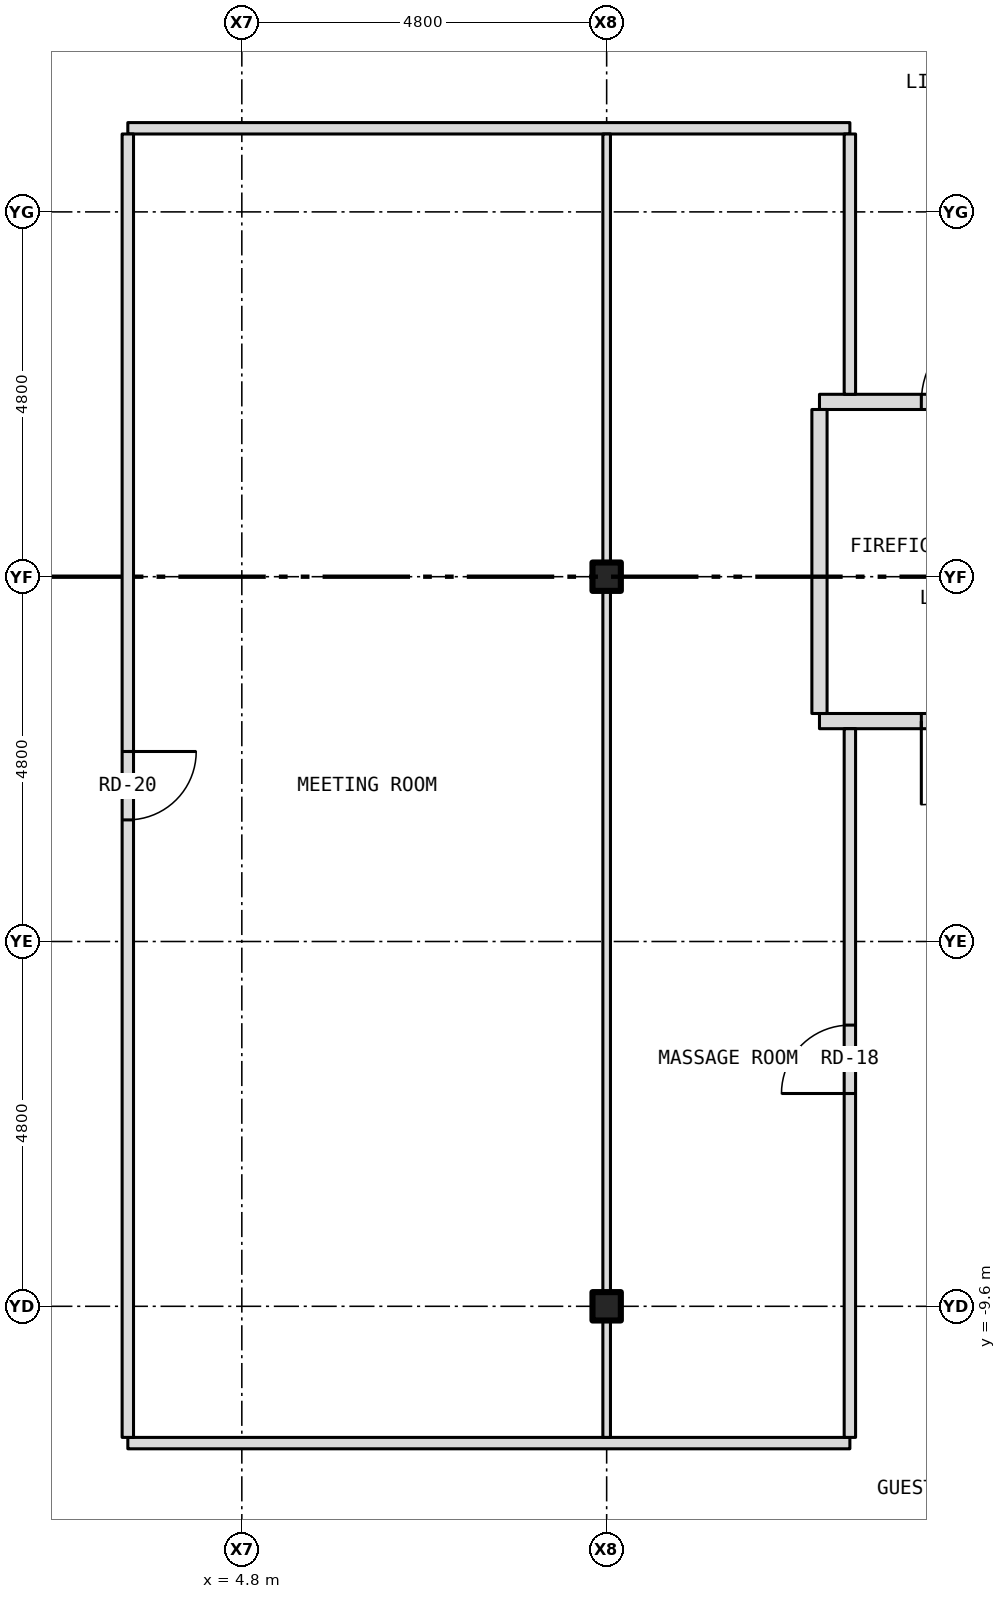
"""IFC4 building model, lengths in metres.
Left out: names, types, materials, properties, quantities, classifications, styles, units other than length and angle.
Written with IfcOpenShell. Run it as: python <this file> out.ifc"""

import sys

from ifc_helpers import new_model, si_unit, direction, frame, frame_2d, origin, origin_2d, place, context, subcontext, project, spatial, rectangle, i_section, extrude, element, fill, save


model = new_model("IFC4")
c1 = context("Model", 3, precision=1e-05, world=origin(), true_north=direction((0.0, 1.0)))
c2 = subcontext(c1, "Body", "Model", "MODEL_VIEW")
j1 = project(units=[si_unit("LENGTHUNIT", "METRE"), si_unit("PLANEANGLEUNIT", "RADIAN")], contexts=[c1])
p1 = place(None, origin())
s1 = spatial("IfcSite", under=j1, at=p1, CompositionType="ELEMENT")
p2 = place(p1, origin())
s2 = spatial("IfcBuilding", under=s1, at=p2, CompositionType="ELEMENT")
p3 = place(p2, frame((0.0, 0.0, 169.0)))
s3 = spatial("IfcBuildingStorey", under=s2, at=p3, CompositionType="ELEMENT", Elevation=169.0)
for number, where, z_axis, x_axis in (
    (1, (9.6, -9.6, -0.15), (0.0, 0.0, 1.0), (1.0, 0.0, 0.0)),
    (2, (9.6, 0.0, -0.15), (0.0, 0.0, 1.0), (1.0, 0.0, 0.0)),
):
    element("IfcColumn", number, at=place(p3, frame(where, z_axis=z_axis, x_axis=x_axis)), inside=s3, PredefinedType="COLUMN", context=c2, shape_type="SweptSolid", body=[
        extrude(i_section(OverallWidth=0.373, OverallDepth=0.373, WebThickness=0.016, FlangeThickness=0.026, at=origin_2d()), origin(), (0.0, 0.0, 1.0), 3.5),
    ])
p4 = place(p3, frame((3.3, -11.4, 0.0), z_axis=(0.0, 0.0, 1.0), x_axis=(1.0, 0.0, 0.0)))
e3 = element("IfcWall", 3, at=p4, inside=s3, PredefinedType="PARTITIONING", context=c2, shape_type="SweptSolid", body=[
    extrude(rectangle(XDim=9.5, YDim=0.15, at=frame_2d((4.75, 0.0))), origin(), (0.0, 0.0, 1.0), 3.35),
])
p5 = place(p3, frame((12.4, -1.9, 0.0), z_axis=(0.0, 0.0, 1.0), x_axis=(1.0, 0.0, 0.0)))
e4 = element("IfcWall", 4, at=p5, inside=s3, PredefinedType="PARTITIONING", context=c2, shape_type="SweptSolid", body=[
    extrude(rectangle(XDim=3.28, YDim=0.2, at=frame_2d((1.64, 0.0))), origin(), (0.0, 0.0, 1.0), 3.35),
])
p6 = place(p5, frame((1.34, 0.0, 0.0)))
e5 = element("IfcOpeningElement", 5, at=p6, cuts=e4, PredefinedType="OPENING", context=c2, shape_type="SweptSolid", body=[
    extrude(rectangle(XDim=1.1, YDim=2.1, at=frame_2d((0.55, 1.05))), frame((0.0, 0.112, 0.0), z_axis=(0.0, -1.0, 0.0), x_axis=(1.0, 0.0, 0.0)), (0.0, 0.0, 1.0), 0.224),
])
p7 = place(p3, frame((12.4, 2.3, 0.0), z_axis=(0.0, 0.0, 1.0), x_axis=(1.0, 0.0, 0.0)))
e6 = element("IfcWall", 6, at=p7, inside=s3, PredefinedType="PARTITIONING", context=c2, shape_type="SweptSolid", body=[
    extrude(rectangle(XDim=3.28, YDim=0.2, at=frame_2d((1.64, 0.0))), origin(), (0.0, 0.0, 1.0), 3.35),
])
p8 = place(p7, frame((1.34, 0.0, 0.0)))
e7 = element("IfcOpeningElement", 7, at=p8, cuts=e6, PredefinedType="OPENING", context=c2, shape_type="SweptSolid", body=[
    extrude(rectangle(XDim=1.1, YDim=2.1, at=frame_2d((0.55, 1.05))), frame((0.0, 0.112, 0.0), z_axis=(0.0, -1.0, 0.0), x_axis=(1.0, 0.0, 0.0)), (0.0, 0.0, 1.0), 0.224),
])
p9 = place(p3, frame((3.3, 5.9, 0.0), z_axis=(0.0, 0.0, 1.0), x_axis=(1.0, 0.0, 0.0)))
e8 = element("IfcWall", 8, at=p9, inside=s3, PredefinedType="PARTITIONING", context=c2, shape_type="SweptSolid", body=[
    extrude(rectangle(XDim=9.5, YDim=0.15, at=frame_2d((4.75, 0.0))), origin(), (0.0, 0.0, 1.0), 3.35),
])
p10 = place(p3, frame((3.3, -11.325, 0.0), z_axis=(0.0, 0.0, 1.0), x_axis=(0.0, 1.0, 0.0)))
e9 = element("IfcWall", 9, at=p10, inside=s3, PredefinedType="PARTITIONING", context=c2, shape_type="SweptSolid", body=[
    extrude(rectangle(XDim=17.15, YDim=0.15, at=frame_2d((8.575, 0.0))), origin(), (0.0, 0.0, 1.0), 3.35),
])
p11 = place(p10, frame((8.125, 0.0, 0.0)))
e10 = element("IfcOpeningElement", 10, at=p11, cuts=e9, PredefinedType="OPENING", context=c2, shape_type="SweptSolid", body=[
    extrude(rectangle(XDim=0.9, YDim=2.1, at=frame_2d((0.45, 1.05))), frame((0.0, 0.087, 0.0), z_axis=(0.0, -1.0, 0.0), x_axis=(1.0, 0.0, 0.0)), (0.0, 0.0, 1.0), 0.174),
])
p12 = place(p3, frame((9.6, -11.325, 0.0), z_axis=(0.0, 0.0, 1.0), x_axis=(0.0, 1.0, 0.0)))
e11 = element("IfcWall", 11, at=p12, inside=s3, PredefinedType="PARTITIONING", context=c2, shape_type="SweptSolid", body=[
    extrude(rectangle(XDim=1.538, YDim=0.1, at=frame_2d((0.769, 0.0))), origin(), (0.0, 0.0, 1.0), 2.728),
])
p13 = place(p3, frame((9.6, -9.787, 0.0), z_axis=(0.0, 0.0, 1.0), x_axis=(0.0, 1.0, 0.0)))
e12 = element("IfcWall", 12, at=p13, inside=s3, PredefinedType="PARTITIONING", context=c2, shape_type="SweptSolid", body=[
    extrude(rectangle(XDim=0.374, YDim=0.1, at=frame_2d((0.187, 0.0))), origin(), (0.0, 0.0, 1.0), 3.35),
])
p14 = place(p3, frame((9.6, -9.413, 0.0), z_axis=(0.0, 0.0, 1.0), x_axis=(0.0, 1.0, 0.0)))
e13 = element("IfcWall", 13, at=p14, inside=s3, PredefinedType="PARTITIONING", context=c2, shape_type="SweptSolid", body=[
    extrude(rectangle(XDim=9.226, YDim=0.1, at=frame_2d((4.613, 0.0))), origin(), (0.0, 0.0, 1.0), 2.728),
])
p15 = place(p3, frame((9.6, -0.187, 0.0), z_axis=(0.0, 0.0, 1.0), x_axis=(0.0, 1.0, 0.0)))
e14 = element("IfcWall", 14, at=p15, inside=s3, PredefinedType="PARTITIONING", context=c2, shape_type="SweptSolid", body=[
    extrude(rectangle(XDim=0.374, YDim=0.1, at=frame_2d((0.187, 0.0))), origin(), (0.0, 0.0, 1.0), 3.35),
])
p16 = place(p3, frame((9.6, 0.187, 0.0), z_axis=(0.0, 0.0, 1.0), x_axis=(0.0, 1.0, 0.0)))
e15 = element("IfcWall", 15, at=p16, inside=s3, PredefinedType="PARTITIONING", context=c2, shape_type="SweptSolid", body=[
    extrude(rectangle(XDim=5.638, YDim=0.1, at=frame_2d((2.819, 0.0))), origin(), (0.0, 0.0, 1.0), 2.728),
])
p17 = place(p3, frame((12.4, -1.8, 0.0), z_axis=(0.0, 0.0, 1.0), x_axis=(0.0, 1.0, 0.0)))
e16 = element("IfcWall", 16, at=p17, inside=s3, PredefinedType="PARTITIONING", context=c2, shape_type="SweptSolid", body=[
    extrude(rectangle(XDim=4.0, YDim=0.2, at=frame_2d((2.0, 0.0))), origin(), (0.0, 0.0, 1.0), 3.35),
])
p18 = place(p3, frame((12.8, -11.325, 0.0), z_axis=(0.0, 0.0, 1.0), x_axis=(0.0, 1.0, 0.0)))
e17 = element("IfcWall", 17, at=p18, inside=s3, PredefinedType="PARTITIONING", context=c2, shape_type="SweptSolid", body=[
    extrude(rectangle(XDim=9.325, YDim=0.15, at=frame_2d((4.663, 0.0))), origin(), (0.0, 0.0, 1.0), 3.35),
])
p19 = place(p18, frame((4.525, 0.0, 0.0)))
e18 = element("IfcOpeningElement", 18, at=p19, cuts=e17, PredefinedType="OPENING", context=c2, shape_type="SweptSolid", body=[
    extrude(rectangle(XDim=0.9, YDim=2.1, at=frame_2d((0.45, 1.05))), frame((0.0, 0.087, 0.0), z_axis=(0.0, -1.0, 0.0), x_axis=(1.0, 0.0, 0.0)), (0.0, 0.0, 1.0), 0.174),
])
p20 = place(p3, frame((12.8, 2.4, 0.0), z_axis=(0.0, 0.0, 1.0), x_axis=(0.0, 1.0, 0.0)))
e19 = element("IfcWall", 19, at=p20, inside=s3, PredefinedType="PARTITIONING", context=c2, shape_type="SweptSolid", body=[
    extrude(rectangle(XDim=3.425, YDim=0.15, at=frame_2d((1.712, 0.0))), origin(), (0.0, 0.0, 1.0), 3.35),
])
p21 = place(p8, origin())
e20 = element("IfcDoor", 20, at=p21, inside=s3, OperationType="SINGLE_SWING_RIGHT", PredefinedType="DOOR", context=c2, shape_type="SweptSolid", body=[
    extrude(rectangle(XDim=1.1, YDim=2.1, at=frame_2d((0.55, 1.05))), frame((0.0, 0.025, 0.0), z_axis=(0.0, -1.0, 0.0), x_axis=(1.0, 0.0, 0.0)), (0.0, 0.0, 1.0), 0.05),
])
fill(e7, e20)
p22 = place(p6, origin())
e21 = element("IfcDoor", 21, at=p22, inside=s3, OperationType="SINGLE_SWING_LEFT", PredefinedType="DOOR", context=c2, shape_type="SweptSolid", body=[
    extrude(rectangle(XDim=1.1, YDim=2.1, at=frame_2d((0.55, 1.05))), frame((0.0, 0.025, 0.0), z_axis=(0.0, -1.0, 0.0), x_axis=(1.0, 0.0, 0.0)), (0.0, 0.0, 1.0), 0.05),
])
fill(e5, e21)
p23 = place(p19, origin())
e22 = element("IfcDoor", 22, at=p23, inside=s3, OperationType="SINGLE_SWING_LEFT", PredefinedType="DOOR", context=c2, shape_type="SweptSolid", body=[
    extrude(rectangle(XDim=0.9, YDim=2.1, at=frame_2d((0.45, 1.05))), frame((0.0, 0.025, 0.0), z_axis=(0.0, -1.0, 0.0), x_axis=(1.0, 0.0, 0.0)), (0.0, 0.0, 1.0), 0.05),
])
fill(e18, e22)
p24 = place(p11, origin())
e23 = element("IfcDoor", 23, at=p24, inside=s3, OperationType="SINGLE_SWING_RIGHT", PredefinedType="DOOR", context=c2, shape_type="SweptSolid", body=[
    extrude(rectangle(XDim=0.9, YDim=2.1, at=frame_2d((0.45, 1.05))), frame((0.0, 0.025, 0.0), z_axis=(0.0, -1.0, 0.0), x_axis=(1.0, 0.0, 0.0)), (0.0, 0.0, 1.0), 0.05),
])
fill(e10, e23)
save(model, sys.argv[1])
